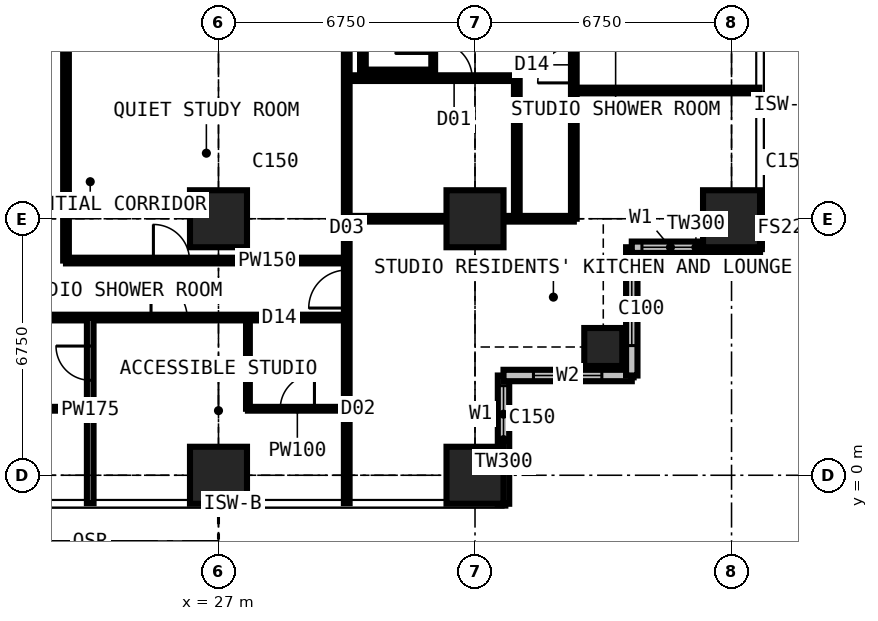
"""IFC4 building model, lengths in metres.
Left out: names, types, materials, properties, quantities, classifications, styles, units other than length and angle.
Written with IfcOpenShell. Run it as: python <this file> out.ifc"""

import sys

from ifc_helpers import new_model, si_unit, direction, frame, frame_2d, origin, origin_2d, place, context, subcontext, project, spatial, rectangle, extrude, element, fill, save


model = new_model("IFC4")
c1 = context("Model", 3, precision=1e-05, world=origin(), true_north=direction((0.0, 1.0)))
c2 = subcontext(c1, "Body", "Model", "MODEL_VIEW")
j1 = project(units=[si_unit("LENGTHUNIT", "METRE"), si_unit("PLANEANGLEUNIT", "RADIAN")], contexts=[c1])
p1 = place(None, origin())
s1 = spatial("IfcSite", under=j1, at=p1, CompositionType="ELEMENT")
p2 = place(p1, origin())
s2 = spatial("IfcBuilding", under=s1, at=p2, CompositionType="ELEMENT")
p3 = place(p2, frame((0.0, 0.0, 130.5)))
s3 = spatial("IfcBuildingStorey", under=s2, at=p3, CompositionType="ELEMENT", Elevation=130.5)
for number, where, z_axis, x_axis in (
    (1, (27.0, 0.0, 0.0), (0.0, 0.0, 1.0), (1.0, 0.0, 0.0)),
    (2, (27.0, 6.75, 0.0), (0.0, 0.0, 1.0), (1.0, 0.0, 0.0)),
    (3, (33.75, 0.0, 0.0), (0.0, 0.0, 1.0), (1.0, 0.0, 0.0)),
    (4, (33.75, 6.75, 0.0), (0.0, 0.0, 1.0), (1.0, 0.0, 0.0)),
):
    element("IfcColumn", number, at=place(p3, frame(where, z_axis=z_axis, x_axis=x_axis)), inside=s3, PredefinedType="COLUMN", context=c2, shape_type="SweptSolid", body=[
        extrude(rectangle(XDim=1.5, YDim=1.5, at=origin_2d()), origin(), (0.0, 0.0, 1.0), 3.6),
    ])
p4 = place(p3, frame((37.125, 3.375, 0.0), z_axis=(0.0, 0.0, 1.0), x_axis=(1.0, 0.0, 0.0)))
e5 = element("IfcColumn", 5, at=p4, inside=s3, PredefinedType="COLUMN", context=c2, shape_type="SweptSolid", body=[
    extrude(rectangle(XDim=1.0, YDim=1.0, at=origin_2d()), origin(), (0.0, 0.0, 1.0), 3.6),
])
p5 = place(p3, frame((40.5, 6.75, 0.0), z_axis=(0.0, 0.0, 1.0), x_axis=(1.0, 0.0, 0.0)))
e6 = element("IfcColumn", 6, at=p5, inside=s3, PredefinedType="COLUMN", context=c2, shape_type="SweptSolid", body=[
    extrude(rectangle(XDim=1.5, YDim=1.5, at=origin_2d()), origin(), (0.0, 0.0, 1.0), 3.6),
])
p6 = place(p3, frame((34.5, -0.75, 0.0), z_axis=(0.0, 0.0, 1.0), x_axis=(0.0, 1.0, 0.0)))
e7 = element("IfcWall", 7, at=p6, inside=s3, PredefinedType="SOLIDWALL", context=c2, shape_type="SweptSolid", body=[
    extrude(rectangle(XDim=3.375, YDim=0.3, at=frame_2d((1.688, 0.0))), origin(), (0.0, 0.0, 1.0), 3.375),
])
p7 = place(p6, frame((1.607, 0.0, 0.9)))
e8 = element("IfcOpeningElement", 8, at=p7, cuts=e7, PredefinedType="OPENING", context=c2, shape_type="SweptSolid", body=[
    extrude(rectangle(XDim=1.5, YDim=1.8, at=frame_2d((0.75, 0.9))), frame((0.0, 0.16, 0.0), z_axis=(0.0, -1.0, 0.0), x_axis=(1.0, 0.0, 0.0)), (0.0, 0.0, 1.0), 0.32),
])
p8 = place(p3, frame((34.5, 2.625, 0.0), z_axis=(0.0, 0.0, 1.0), x_axis=(1.0, 0.0, 0.0)))
e9 = element("IfcWall", 9, at=p8, inside=s3, PredefinedType="SOLIDWALL", context=c2, shape_type="SweptSolid", body=[
    extrude(rectangle(XDim=3.375, YDim=0.3, at=frame_2d((1.688, 0.0))), origin(), (0.0, 0.0, 1.0), 3.375),
])
p9 = place(p8, frame((0.788, 0.0, 0.6)))
e10 = element("IfcOpeningElement", 10, at=p9, cuts=e9, PredefinedType="OPENING", context=c2, shape_type="SweptSolid", body=[
    extrude(rectangle(XDim=1.8, YDim=2.1, at=frame_2d((0.9, 1.05))), frame((0.0, 0.16, 0.0), z_axis=(0.0, -1.0, 0.0), x_axis=(1.0, 0.0, 0.0)), (0.0, 0.0, 1.0), 0.32),
])
p10 = place(p3, frame((37.875, 2.625, 0.0), z_axis=(0.0, 0.0, 1.0), x_axis=(0.0, 1.0, 0.0)))
e11 = element("IfcWall", 11, at=p10, inside=s3, PredefinedType="SOLIDWALL", context=c2, shape_type="SweptSolid", body=[
    extrude(rectangle(XDim=3.375, YDim=0.3, at=frame_2d((1.688, 0.0))), origin(), (0.0, 0.0, 1.0), 3.375),
])
p11 = place(p10, frame((0.788, 0.0, 0.6)))
e12 = element("IfcOpeningElement", 12, at=p11, cuts=e11, PredefinedType="OPENING", context=c2, shape_type="SweptSolid", body=[
    extrude(rectangle(XDim=1.8, YDim=2.1, at=frame_2d((0.9, 1.05))), frame((0.0, 0.16, 0.0), z_axis=(0.0, -1.0, 0.0), x_axis=(1.0, 0.0, 0.0)), (0.0, 0.0, 1.0), 0.32),
])
p12 = place(p3, frame((37.875, 6.0, 0.0), z_axis=(0.0, 0.0, 1.0), x_axis=(1.0, 0.0, 0.0)))
e13 = element("IfcWall", 13, at=p12, inside=s3, PredefinedType="SOLIDWALL", context=c2, shape_type="SweptSolid", body=[
    extrude(rectangle(XDim=3.375, YDim=0.3, at=frame_2d((1.688, 0.0))), origin(), (0.0, 0.0, 1.0), 3.375),
])
p13 = place(p12, frame((0.268, 0.0, 0.9)))
e14 = element("IfcOpeningElement", 14, at=p13, cuts=e13, PredefinedType="OPENING", context=c2, shape_type="SweptSolid", body=[
    extrude(rectangle(XDim=1.5, YDim=1.8, at=frame_2d((0.75, 0.9))), frame((0.0, 0.16, 0.0), z_axis=(0.0, -1.0, 0.0), x_axis=(1.0, 0.0, 0.0)), (0.0, 0.0, 1.0), 0.32),
])
p14 = place(p3, frame((6.75, 4.15, 0.0), z_axis=(0.0, 0.0, 1.0), x_axis=(1.0, 0.0, 0.0)))
e15 = element("IfcWall", 15, at=p14, inside=s3, PredefinedType="PARTITIONING", context=c2, shape_type="SweptSolid", body=[
    extrude(rectangle(XDim=23.625, YDim=0.15, at=frame_2d((11.812, 0.0))), origin(), (0.0, 0.0, 1.0), 3.375),
])
p15 = place(p14, frame((1.2, 0.0, 0.0)))
e16 = element("IfcOpeningElement", 16, at=p15, cuts=e15, PredefinedType="OPENING", context=c2, shape_type="SweptSolid", body=[
    extrude(rectangle(XDim=1.0, YDim=2.2, at=frame_2d((0.5, 1.1))), frame((0.0, 0.085, 0.0), z_axis=(0.0, -1.0, 0.0), x_axis=(1.0, 0.0, 0.0)), (0.0, 0.0, 1.0), 0.17),
])
p16 = place(p14, frame((3.575, 0.0, 0.0)))
e17 = element("IfcOpeningElement", 17, at=p16, cuts=e15, PredefinedType="OPENING", context=c2, shape_type="SweptSolid", body=[
    extrude(rectangle(XDim=0.95, YDim=2.2, at=frame_2d((0.475, 1.1))), frame((0.0, 0.085, 0.0), z_axis=(0.0, -1.0, 0.0), x_axis=(1.0, 0.0, 0.0)), (0.0, 0.0, 1.0), 0.17),
])
p17 = place(p14, frame((7.0, 0.0, 0.0)))
e18 = element("IfcOpeningElement", 18, at=p17, cuts=e15, PredefinedType="OPENING", context=c2, shape_type="SweptSolid", body=[
    extrude(rectangle(XDim=0.95, YDim=2.2, at=frame_2d((0.475, 1.1))), frame((0.0, 0.085, 0.0), z_axis=(0.0, -1.0, 0.0), x_axis=(1.0, 0.0, 0.0)), (0.0, 0.0, 1.0), 0.17),
])
p18 = place(p14, frame((18.475, 0.0, 0.0)))
e19 = element("IfcOpeningElement", 19, at=p18, cuts=e15, PredefinedType="OPENING", context=c2, shape_type="SweptSolid", body=[
    extrude(rectangle(XDim=0.95, YDim=2.2, at=frame_2d((0.475, 1.1))), frame((0.0, 0.085, 0.0), z_axis=(0.0, -1.0, 0.0), x_axis=(1.0, 0.0, 0.0)), (0.0, 0.0, 1.0), 0.17),
])
p19 = place(p14, frame((11.725, 0.0, 0.0)))
e20 = element("IfcOpeningElement", 20, at=p19, cuts=e15, PredefinedType="OPENING", context=c2, shape_type="SweptSolid", body=[
    extrude(rectangle(XDim=0.95, YDim=2.2, at=frame_2d((0.475, 1.1))), frame((0.0, 0.085, 0.0), z_axis=(0.0, -1.0, 0.0), x_axis=(1.0, 0.0, 0.0)), (0.0, 0.0, 1.0), 0.17),
])
p20 = place(p3, frame((21.025, 1.75, 0.0), z_axis=(0.0, 0.0, 1.0), x_axis=(1.0, 0.0, 0.0)))
e21 = element("IfcWall", 21, at=p20, inside=s3, PredefinedType="PARTITIONING", context=c2, shape_type="SweptSolid", body=[
    extrude(rectangle(XDim=2.6, YDim=0.1, at=frame_2d((1.3, 0.0))), origin(), (0.0, 0.0, 1.0), 3.375),
])
p21 = place(p3, frame((22.988, 5.65, 0.0), z_axis=(0.0, 0.0, 1.0), x_axis=(1.0, 0.0, 0.0)))
e22 = element("IfcWall", 22, at=p21, inside=s3, PredefinedType="PARTITIONING", context=c2, shape_type="SweptSolid", body=[
    extrude(rectangle(XDim=7.387, YDim=0.15, at=frame_2d((3.694, 0.0))), origin(), (0.0, 0.0, 1.0), 3.375),
])
p22 = place(p21, frame((2.3, 0.0, 0.0)))
e23 = element("IfcOpeningElement", 23, at=p22, cuts=e22, PredefinedType="OPENING", context=c2, shape_type="SweptSolid", body=[
    extrude(rectangle(XDim=0.95, YDim=2.2, at=frame_2d((0.475, 1.1))), frame((0.0, 0.085, 0.0), z_axis=(0.0, -1.0, 0.0), x_axis=(1.0, 0.0, 0.0)), (0.0, 0.0, 1.0), 0.17),
])
p23 = place(p3, frame((22.988, 5.65, 0.0), z_axis=(0.0, 0.0, 1.0), x_axis=(0.0, 1.0, 0.0)))
e24 = element("IfcWall", 24, at=p23, inside=s3, PredefinedType="PARTITIONING", context=c2, shape_type="SweptSolid", body=[
    extrude(rectangle(XDim=5.65, YDim=0.15, at=frame_2d((2.825, 0.0))), origin(), (0.0, 0.0, 1.0), 3.375),
])
p24 = place(p3, frame((23.625, -0.734, 0.0), z_axis=(0.0, 0.0, 1.0), x_axis=(0.0, 1.0, 0.0)))
e25 = element("IfcWall", 25, at=p24, inside=s3, PredefinedType="PARTITIONING", context=c2, shape_type="SweptSolid", body=[
    extrude(rectangle(XDim=4.884, YDim=0.175, at=frame_2d((2.442, 0.0))), origin(), (0.0, 0.0, 1.0), 3.375),
])
p25 = place(p24, frame((3.234, 0.0, 0.0)))
e26 = element("IfcOpeningElement", 26, at=p25, cuts=e25, PredefinedType="OPENING", context=c2, shape_type="SweptSolid", body=[
    extrude(rectangle(XDim=0.9, YDim=2.2, at=frame_2d((0.45, 1.1))), frame((0.0, 0.097, 0.0), z_axis=(0.0, -1.0, 0.0), x_axis=(1.0, 0.0, 0.0)), (0.0, 0.0, 1.0), 0.195),
])
p26 = place(p3, frame((27.775, 1.75, 0.0), z_axis=(0.0, 0.0, 1.0), x_axis=(0.0, 1.0, 0.0)))
e27 = element("IfcWall", 27, at=p26, inside=s3, PredefinedType="PARTITIONING", context=c2, shape_type="SweptSolid", body=[
    extrude(rectangle(XDim=2.4, YDim=0.1, at=frame_2d((1.2, 0.0))), origin(), (0.0, 0.0, 1.0), 3.375),
])
p27 = place(p3, frame((27.775, 1.75, 0.0), z_axis=(0.0, 0.0, 1.0), x_axis=(1.0, 0.0, 0.0)))
e28 = element("IfcWall", 28, at=p27, inside=s3, PredefinedType="PARTITIONING", context=c2, shape_type="SweptSolid", body=[
    extrude(rectangle(XDim=2.6, YDim=0.1, at=frame_2d((1.3, 0.0))), origin(), (0.0, 0.0, 1.0), 3.375),
])
p28 = place(p27, frame((0.85, 0.0, 0.0)))
e29 = element("IfcOpeningElement", 29, at=p28, cuts=e28, PredefinedType="OPENING", context=c2, shape_type="SweptSolid", body=[
    extrude(rectangle(XDim=0.9, YDim=2.2, at=frame_2d((0.45, 1.1))), frame((0.0, 0.06, 0.0), z_axis=(0.0, -1.0, 0.0), x_axis=(1.0, 0.0, 0.0)), (0.0, 0.0, 1.0), 0.12),
])
p29 = place(p3, frame((30.375, -0.734, 0.0), z_axis=(0.0, 0.0, 1.0), x_axis=(0.0, 1.0, 0.0)))
e30 = element("IfcWall", 30, at=p29, inside=s3, PredefinedType="PARTITIONING", context=c2, shape_type="SweptSolid", body=[
    extrude(rectangle(XDim=12.034, YDim=0.15, at=frame_2d((6.017, 0.0))), origin(), (0.0, 0.0, 1.0), 3.375),
])
p30 = place(p29, frame((5.134, 0.0, 0.0)))
e31 = element("IfcOpeningElement", 31, at=p30, cuts=e30, PredefinedType="OPENING", context=c2, shape_type="SweptSolid", body=[
    extrude(rectangle(XDim=1.0, YDim=2.2, at=frame_2d((0.5, 1.1))), frame((0.0, 0.085, 0.0), z_axis=(0.0, -1.0, 0.0), x_axis=(1.0, 0.0, 0.0)), (0.0, 0.0, 1.0), 0.17),
])
p31 = place(p3, frame((30.375, 6.75, 0.0), z_axis=(0.0, 0.0, 1.0), x_axis=(1.0, 0.0, 0.0)))
e32 = element("IfcWall", 32, at=p31, inside=s3, PredefinedType="PARTITIONING", context=c2, shape_type="SweptSolid", body=[
    extrude(rectangle(XDim=5.975, YDim=0.15, at=frame_2d((2.988, 0.0))), origin(), (0.0, 0.0, 1.0), 2.877),
])
p32 = place(p3, frame((30.375, 10.45, 0.0), z_axis=(0.0, 0.0, 1.0), x_axis=(1.0, 0.0, 0.0)))
e33 = element("IfcWall", 33, at=p32, inside=s3, PredefinedType="PARTITIONING", context=c2, shape_type="SweptSolid", body=[
    extrude(rectangle(XDim=4.475, YDim=0.15, at=frame_2d((2.238, 0.0))), origin(), (0.0, 0.0, 1.0), 3.375),
])
p33 = place(p32, frame((2.35, 0.0, 0.0)))
e34 = element("IfcOpeningElement", 34, at=p33, cuts=e33, PredefinedType="OPENING", context=c2, shape_type="SweptSolid", body=[
    extrude(rectangle(XDim=0.95, YDim=2.2, at=frame_2d((0.475, 1.1))), frame((0.0, 0.085, 0.0), z_axis=(0.0, -1.0, 0.0), x_axis=(1.0, 0.0, 0.0)), (0.0, 0.0, 1.0), 0.17),
])
p34 = place(p3, frame((30.8, 10.6, 0.0), z_axis=(0.0, 0.0, 1.0), x_axis=(0.0, 1.0, 0.0)))
e35 = element("IfcWall", 35, at=p34, inside=s3, PredefinedType="PARTITIONING", context=c2, shape_type="SweptSolid", body=[
    extrude(rectangle(XDim=0.7, YDim=0.15, at=frame_2d((0.35, 0.0))), origin(), (0.0, 0.0, 1.0), 3.375),
])
p35 = place(p3, frame((30.8, 10.6, 0.0), z_axis=(0.0, 0.0, 1.0), x_axis=(1.0, 0.0, 0.0)))
e36 = element("IfcWall", 36, at=p35, inside=s3, PredefinedType="PARTITIONING", context=c2, shape_type="SweptSolid", body=[
    extrude(rectangle(XDim=1.85, YDim=0.15, at=frame_2d((0.925, 0.0))), origin(), (0.0, 0.0, 1.0), 3.375),
])
p36 = place(p3, frame((32.65, 10.6, 0.0), z_axis=(0.0, 0.0, 1.0), x_axis=(0.0, 1.0, 0.0)))
e37 = element("IfcWall", 37, at=p36, inside=s3, PredefinedType="SHEAR", context=c2, shape_type="SweptSolid", body=[
    extrude(rectangle(XDim=9.3, YDim=0.1, at=frame_2d((4.65, 0.0))), origin(), (0.0, 0.0, 1.0), 3.375),
])
p37 = place(p36, frame((0.5, 0.0, 0.0)))
e38 = element("IfcOpeningElement", 38, at=p37, cuts=e37, PredefinedType="OPENING", context=c2, shape_type="SweptSolid", body=[
    extrude(rectangle(XDim=1.0, YDim=2.2, at=frame_2d((0.5, 1.1))), frame((0.0, 0.06, 0.0), z_axis=(0.0, -1.0, 0.0), x_axis=(1.0, 0.0, 0.0)), (0.0, 0.0, 1.0), 0.12),
])
p38 = place(p3, frame((34.85, 6.75, 0.0), z_axis=(0.0, 0.0, 1.0), x_axis=(0.0, 1.0, 0.0)))
e39 = element("IfcWall", 39, at=p38, inside=s3, PredefinedType="PARTITIONING", context=c2, shape_type="SweptSolid", body=[
    extrude(rectangle(XDim=3.7, YDim=0.15, at=frame_2d((1.85, 0.0))), origin(), (0.0, 0.0, 1.0), 3.375),
])
p39 = place(p3, frame((36.35, 6.75, 0.0), z_axis=(0.0, 0.0, 1.0), x_axis=(0.0, 1.0, 0.0)))
e40 = element("IfcWall", 40, at=p39, inside=s3, PredefinedType="PARTITIONING", context=c2, shape_type="SweptSolid", body=[
    extrude(rectangle(XDim=20.25, YDim=0.15, at=frame_2d((10.125, 0.0))), origin(), (0.0, 0.0, 1.0), 3.375),
])
p40 = place(p39, frame((3.575, 0.0, 0.0)))
e41 = element("IfcOpeningElement", 41, at=p40, cuts=e40, PredefinedType="OPENING", context=c2, shape_type="SweptSolid", body=[
    extrude(rectangle(XDim=0.95, YDim=2.2, at=frame_2d((0.475, 1.1))), frame((0.0, 0.085, 0.0), z_axis=(0.0, -1.0, 0.0), x_axis=(1.0, 0.0, 0.0)), (0.0, 0.0, 1.0), 0.17),
])
p41 = place(p39, frame((7.0, 0.0, 0.0)))
e42 = element("IfcOpeningElement", 42, at=p41, cuts=e40, PredefinedType="OPENING", context=c2, shape_type="SweptSolid", body=[
    extrude(rectangle(XDim=0.95, YDim=2.2, at=frame_2d((0.475, 1.1))), frame((0.0, 0.085, 0.0), z_axis=(0.0, -1.0, 0.0), x_axis=(1.0, 0.0, 0.0)), (0.0, 0.0, 1.0), 0.17),
])
p42 = place(p39, frame((10.375, 0.0, 0.0)))
e43 = element("IfcOpeningElement", 43, at=p42, cuts=e40, PredefinedType="OPENING", context=c2, shape_type="SweptSolid", body=[
    extrude(rectangle(XDim=0.95, YDim=2.2, at=frame_2d((0.475, 1.1))), frame((0.0, 0.085, 0.0), z_axis=(0.0, -1.0, 0.0), x_axis=(1.0, 0.0, 0.0)), (0.0, 0.0, 1.0), 0.17),
])
p43 = place(p39, frame((13.75, 0.0, 0.0)))
e44 = element("IfcOpeningElement", 44, at=p43, cuts=e40, PredefinedType="OPENING", context=c2, shape_type="SweptSolid", body=[
    extrude(rectangle(XDim=0.95, YDim=2.2, at=frame_2d((0.475, 1.1))), frame((0.0, 0.085, 0.0), z_axis=(0.0, -1.0, 0.0), x_axis=(1.0, 0.0, 0.0)), (0.0, 0.0, 1.0), 0.17),
])
p44 = place(p39, frame((17.125, 0.0, 0.0)))
e45 = element("IfcOpeningElement", 45, at=p44, cuts=e40, PredefinedType="OPENING", context=c2, shape_type="SweptSolid", body=[
    extrude(rectangle(XDim=0.95, YDim=2.2, at=frame_2d((0.475, 1.1))), frame((0.0, 0.085, 0.0), z_axis=(0.0, -1.0, 0.0), x_axis=(1.0, 0.0, 0.0)), (0.0, 0.0, 1.0), 0.17),
])
p45 = place(p3, frame((36.35, 10.125, 0.0), z_axis=(0.0, 0.0, 1.0), x_axis=(1.0, 0.0, 0.0)))
e46 = element("IfcWall", 46, at=p45, inside=s3, PredefinedType="PARTITIONING", context=c2, shape_type="SweptSolid", body=[
    extrude(rectangle(XDim=4.884, YDim=0.15, at=frame_2d((2.442, 0.0))), origin(), (0.0, 0.0, 1.0), 3.375),
])
p46 = place(p7, origin())
e47 = element("IfcWindow", 47, at=p46, inside=s3, PartitioningType="SINGLE_PANEL", PredefinedType="WINDOW", context=c2, shape_type="SweptSolid", body=[
    extrude(rectangle(XDim=1.5, YDim=1.8, at=frame_2d((0.75, 0.9))), frame((0.0, 0.03, 0.0), z_axis=(0.0, -1.0, 0.0), x_axis=(1.0, 0.0, 0.0)), (0.0, 0.0, 1.0), 0.06),
])
fill(e8, e47)
p47 = place(p9, origin())
e48 = element("IfcWindow", 48, at=p47, inside=s3, PartitioningType="SINGLE_PANEL", PredefinedType="WINDOW", context=c2, shape_type="SweptSolid", body=[
    extrude(rectangle(XDim=1.8, YDim=2.1, at=frame_2d((0.9, 1.05))), frame((0.0, 0.03, 0.0), z_axis=(0.0, -1.0, 0.0), x_axis=(1.0, 0.0, 0.0)), (0.0, 0.0, 1.0), 0.06),
])
fill(e10, e48)
p48 = place(p11, origin())
e49 = element("IfcWindow", 49, at=p48, inside=s3, PartitioningType="SINGLE_PANEL", PredefinedType="WINDOW", context=c2, shape_type="SweptSolid", body=[
    extrude(rectangle(XDim=1.8, YDim=2.1, at=frame_2d((0.9, 1.05))), frame((0.0, 0.03, 0.0), z_axis=(0.0, -1.0, 0.0), x_axis=(1.0, 0.0, 0.0)), (0.0, 0.0, 1.0), 0.06),
])
fill(e12, e49)
p49 = place(p13, origin())
e50 = element("IfcWindow", 50, at=p49, inside=s3, PartitioningType="SINGLE_PANEL", PredefinedType="WINDOW", context=c2, shape_type="SweptSolid", body=[
    extrude(rectangle(XDim=1.5, YDim=1.8, at=frame_2d((0.75, 0.9))), frame((0.0, 0.03, 0.0), z_axis=(0.0, -1.0, 0.0), x_axis=(1.0, 0.0, 0.0)), (0.0, 0.0, 1.0), 0.06),
])
fill(e14, e50)
p50 = place(p18, origin())
e51 = element("IfcDoor", 51, at=p50, inside=s3, OperationType="SINGLE_SWING_LEFT", PredefinedType="DOOR", context=c2, shape_type="SweptSolid", body=[
    extrude(rectangle(XDim=0.95, YDim=2.2, at=frame_2d((0.475, 1.1))), frame((0.0, 0.025, 0.0), z_axis=(0.0, -1.0, 0.0), x_axis=(1.0, 0.0, 0.0)), (0.0, 0.0, 1.0), 0.05),
])
fill(e19, e51)
p51 = place(p28, origin())
e52 = element("IfcDoor", 52, at=p51, inside=s3, OperationType="SINGLE_SWING_RIGHT", PredefinedType="DOOR", context=c2, shape_type="SweptSolid", body=[
    extrude(rectangle(XDim=0.9, YDim=2.2, at=frame_2d((0.45, 1.1))), frame((0.0, 0.025, 0.0), z_axis=(0.0, -1.0, 0.0), x_axis=(1.0, 0.0, 0.0)), (0.0, 0.0, 1.0), 0.05),
])
fill(e29, e52)
p52 = place(p25, origin())
e53 = element("IfcDoor", 53, at=p52, inside=s3, OperationType="SINGLE_SWING_RIGHT", PredefinedType="DOOR", context=c2, shape_type="SweptSolid", body=[
    extrude(rectangle(XDim=0.9, YDim=2.2, at=frame_2d((0.45, 1.1))), frame((0.0, 0.025, 0.0), z_axis=(0.0, -1.0, 0.0), x_axis=(1.0, 0.0, 0.0)), (0.0, 0.0, 1.0), 0.05),
])
fill(e26, e53)
p53 = place(p22, origin())
e54 = element("IfcDoor", 54, at=p53, inside=s3, OperationType="SINGLE_SWING_LEFT", PredefinedType="DOOR", context=c2, shape_type="SweptSolid", body=[
    extrude(rectangle(XDim=0.95, YDim=2.2, at=frame_2d((0.475, 1.1))), frame((0.0, 0.025, 0.0), z_axis=(0.0, -1.0, 0.0), x_axis=(1.0, 0.0, 0.0)), (0.0, 0.0, 1.0), 0.05),
])
fill(e23, e54)
p54 = place(p30, origin())
e55 = element("IfcDoor", 55, at=p54, inside=s3, OperationType="SINGLE_SWING_LEFT", PredefinedType="DOOR", context=c2, shape_type="SweptSolid", body=[
    extrude(rectangle(XDim=1.0, YDim=2.2, at=frame_2d((0.5, 1.1))), frame((0.0, 0.025, 0.0), z_axis=(0.0, -1.0, 0.0), x_axis=(1.0, 0.0, 0.0)), (0.0, 0.0, 1.0), 0.05),
])
fill(e31, e55)
p55 = place(p40, origin())
e56 = element("IfcDoor", 56, at=p55, inside=s3, OperationType="SINGLE_SWING_LEFT", PredefinedType="DOOR", context=c2, shape_type="SweptSolid", body=[
    extrude(rectangle(XDim=0.95, YDim=2.2, at=frame_2d((0.475, 1.1))), frame((0.0, 0.025, 0.0), z_axis=(0.0, -1.0, 0.0), x_axis=(1.0, 0.0, 0.0)), (0.0, 0.0, 1.0), 0.05),
])
fill(e41, e56)
p56 = place(p37, origin())
e57 = element("IfcDoor", 57, at=p56, inside=s3, OperationType="SINGLE_SWING_LEFT", PredefinedType="DOOR", context=c2, shape_type="SweptSolid", body=[
    extrude(rectangle(XDim=1.0, YDim=2.2, at=frame_2d((0.5, 1.1))), frame((0.0, 0.025, 0.0), z_axis=(0.0, -1.0, 0.0), x_axis=(1.0, 0.0, 0.0)), (0.0, 0.0, 1.0), 0.05),
])
fill(e38, e57)
p57 = place(p33, origin())
e58 = element("IfcDoor", 58, at=p57, inside=s3, OperationType="SINGLE_SWING_LEFT", PredefinedType="DOOR", context=c2, shape_type="SweptSolid", body=[
    extrude(rectangle(XDim=0.95, YDim=2.2, at=frame_2d((0.475, 1.1))), frame((0.0, 0.025, 0.0), z_axis=(0.0, -1.0, 0.0), x_axis=(1.0, 0.0, 0.0)), (0.0, 0.0, 1.0), 0.05),
])
fill(e34, e58)
save(model, sys.argv[1])
